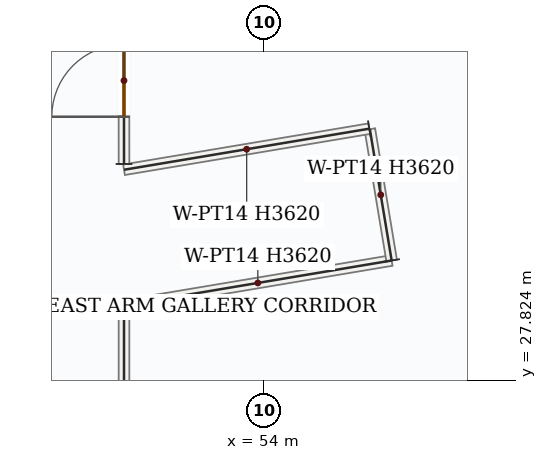
"""IFC4 building model, lengths in metres.
Left out: names, types, materials, properties, quantities, classifications, styles, units other than length and angle.
Written with IfcOpenShell. Run it as: python <this file> out.ifc"""

import sys

from ifc_helpers import new_model, si_unit, direction, frame, frame_2d, origin, place, context, subcontext, project, spatial, rectangle, extrude, source, transform, mapped, element, fill, save


model = new_model("IFC4")
c1 = context("Model", 3, precision=1e-05, world=origin(), true_north=direction((0.0, 1.0)))
c2 = subcontext(c1, "Body", "Model", "MODEL_VIEW")
j1 = project(units=[si_unit("LENGTHUNIT", "METRE"), si_unit("PLANEANGLEUNIT", "RADIAN")], contexts=[c1])
p1 = place(None, origin())
s1 = spatial("IfcSite", under=j1, at=p1, CompositionType="ELEMENT")
p2 = place(p1, origin())
s2 = spatial("IfcBuilding", under=s1, at=p2, CompositionType="ELEMENT")
p3 = place(p2, frame((0.0, 0.0, 139.5)))
s3 = spatial("IfcBuildingStorey", under=s2, at=p3, CompositionType="ELEMENT", Elevation=139.5)
m1 = source(origin(), c2, "Body", "SweptSolid", [
    extrude(rectangle(XDim=8.203, YDim=0.14, at=frame_2d((4.101, 0.0))), origin(), (0.0, 0.0, 1.0), 2.693),
])
p4 = place(p3, frame((52.15, 20.608, 0.0), z_axis=(0.0, 0.0, 1.0), x_axis=(2.9763676e-05, 0.999999999557, 0.0)))
e1 = element("IfcWall", 1, at=p4, inside=s3, PredefinedType="PARTITIONING", context=c2, shape_type="MappedRepresentation", body=[
    mapped(m1, transform((0.0, 0.0, 0.0), x_axis=(1.0, 0.0, 0.0), y_axis=(0.0, 1.0, 0.0), z_axis=(0.0, 0.0, 1.0), scale=1.0)),
])
m2 = source(origin(), c2, "Body", "SweptSolid", [
    extrude(rectangle(XDim=3.57, YDim=0.14, at=frame_2d((1.785, 0.0))), origin(), (0.0, 0.0, 1.0), 3.62),
])
p5 = place(p3, frame((52.15, 28.81, 0.0), z_axis=(0.0, 0.0, 1.0), x_axis=(0.98622523321, 0.165407948356, 0.0)))
e2 = element("IfcWall", 2, at=p5, inside=s3, PredefinedType="PARTITIONING", context=c2, shape_type="MappedRepresentation", body=[
    mapped(m2, transform((0.0, 0.0, 0.0), x_axis=(1.0, 0.0, 0.0), y_axis=(0.0, 1.0, 0.0), z_axis=(0.0, 0.0, 1.0), scale=1.0)),
])
m3 = source(origin(), c2, "Body", "SweptSolid", [
    extrude(rectangle(XDim=1.751, YDim=0.14, at=frame_2d((0.875, 0.0))), origin(), (0.0, 0.0, 1.0), 3.62),
])
p6 = place(p3, frame((55.671, 29.401, 0.0), z_axis=(0.0, 0.0, 1.0), x_axis=(-0.163946827652, 0.986469177269, 0.0)))
e3 = element("IfcWall", 3, at=p6, inside=s3, PredefinedType="PARTITIONING", context=c2, shape_type="MappedRepresentation", body=[
    mapped(m3, transform((0.0, 0.0, 0.0), x_axis=(1.0, 0.0, 0.0), y_axis=(0.0, 1.0, 0.0), z_axis=(0.0, 0.0, 1.0), scale=1.0)),
])
m4 = source(origin(), c2, "Body", "SweptSolid", [
    extrude(rectangle(XDim=3.272, YDim=0.14, at=frame_2d((1.636, 0.0))), origin(), (0.0, 0.0, 1.0), 3.62),
])
p7 = place(p3, frame((55.377, 31.135, 0.0), z_axis=(0.0, 0.0, 1.0), x_axis=(-0.986274692216, -0.165112784165, 0.0)))
e4 = element("IfcWall", 4, at=p7, inside=s3, PredefinedType="PARTITIONING", context=c2, shape_type="MappedRepresentation", body=[
    mapped(m4, transform((0.0, 0.0, 0.0), x_axis=(1.0, 0.0, 0.0), y_axis=(0.0, 1.0, 0.0), z_axis=(0.0, 0.0, 1.0), scale=1.0)),
])
p8 = place(p3, frame((52.15, 30.671, 0.0), z_axis=(0.0, 0.0, 1.0), x_axis=(-0.000447667607, 0.999999899797, 0.0)))
e5 = element("IfcWall", 5, at=p8, inside=s3, PredefinedType="PARTITIONING", context=c2, shape_type="SweptSolid", body=[
    extrude(rectangle(XDim=2.727, YDim=0.14, at=frame_2d((1.363, 0.0))), origin(), (0.0, 0.0, 1.0), 3.079),
])
p9 = place(p8, frame((0.622, 0.0, 0.0)))
e6 = element("IfcOpeningElement", 6, at=p9, cuts=e5, PredefinedType="OPENING", context=c2, shape_type="SweptSolid", body=[
    extrude(rectangle(XDim=0.95, YDim=2.15, at=frame_2d((0.475, 1.075))), frame((0.0, 0.08, 0.0), z_axis=(0.0, -1.0, 0.0), x_axis=(1.0, 0.0, 0.0)), (0.0, 0.0, 1.0), 0.16),
])
m5 = source(origin(), c2, "Body", "SweptSolid", [
    extrude(rectangle(XDim=0.95, YDim=2.15, at=frame_2d((0.475, 1.075))), frame((0.0, 0.025, 0.0), z_axis=(0.0, -1.0, 0.0), x_axis=(1.0, 0.0, 0.0)), (0.0, 0.0, 1.0), 0.05),
])
p10 = place(p9, origin())
e7 = element("IfcDoor", 7, at=p10, inside=s3, OperationType="SINGLE_SWING_LEFT", PredefinedType="DOOR", context=c2, shape_type="MappedRepresentation", body=[
    mapped(m5, transform((0.0, 0.0, 0.0), x_axis=(1.0, 0.0, 0.0), y_axis=(0.0, 1.0, 0.0), z_axis=(0.0, 0.0, 1.0), scale=1.0)),
])
fill(e6, e7)
save(model, sys.argv[1])
